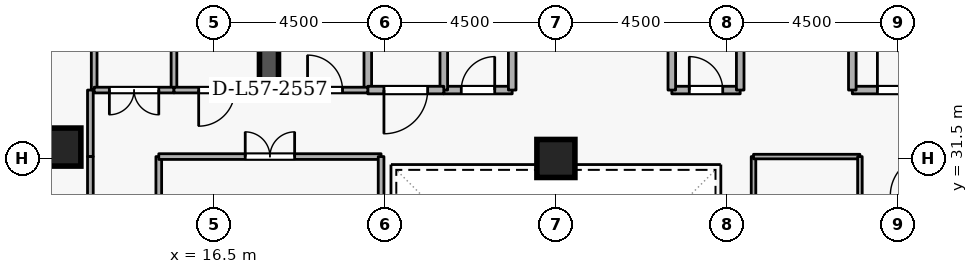
"""IFC4 building model, lengths in metres.
Left out: names, types, materials, properties, quantities, classifications, styles, units other than length and angle.
Written with IfcOpenShell. Run it as: python <this file> out.ifc"""

import sys

from ifc_helpers import new_model, si_unit, direction, frame, frame_2d, origin, origin_2d, place, context, subcontext, project, spatial, rectangle, extrude, element, fill, save


model = new_model("IFC4")
c1 = context("Model", 3, precision=1e-05, world=origin(), true_north=direction((0.0, 1.0)))
c2 = subcontext(c1, "Body", "Model", "MODEL_VIEW")
j1 = project(units=[si_unit("LENGTHUNIT", "METRE"), si_unit("PLANEANGLEUNIT", "RADIAN")], contexts=[c1])
p1 = place(None, origin())
s1 = spatial("IfcSite", under=j1, at=p1, CompositionType="ELEMENT")
p2 = place(p1, origin())
s2 = spatial("IfcBuilding", under=s1, at=p2, CompositionType="ELEMENT")
p3 = place(p2, frame((0.0, 0.0, 214.5)))
s3 = spatial("IfcBuildingStorey", under=s2, at=p3, CompositionType="ELEMENT", Elevation=214.5)
p4 = place(p3, frame((17.95, 33.1, 0.0), z_axis=(0.0, 0.0, 1.0), x_axis=(0.0, 1.0, 0.0)))
e1 = element("IfcWall", 1, at=p4, inside=s3, PredefinedType="SHEAR", context=c2, shape_type="SweptSolid", body=[
    extrude(rectangle(XDim=5.8, YDim=0.5, at=frame_2d((2.9, 0.0))), origin(), (0.0, 0.0, 1.0), 3.6),
])
for number, where, z_axis, x_axis in (
    (2, (12.5, 31.8, 0.0), (0.0, 0.0, 1.0), (1.0, 0.0, 0.0)),
    (3, (25.5, 31.5, 0.0), (0.0, 0.0, 1.0), (1.0, 0.0, 0.0)),
):
    element("IfcColumn", number, at=place(p3, frame(where, z_axis=z_axis, x_axis=x_axis)), inside=s3, PredefinedType="COLUMN", context=c2, shape_type="SweptSolid", body=[
        extrude(rectangle(XDim=1.0, YDim=1.0, at=origin_2d()), origin(), (0.0, 0.0, 1.0), 3.6),
    ])
p5 = place(p3, frame((33.3, 33.3, 0.0), z_axis=(0.0, 0.0, 1.0), x_axis=(1.0, 0.0, 0.0)))
e4 = element("IfcWall", 4, at=p5, inside=s3, PredefinedType="STANDARD", context=c2, shape_type="SweptSolid", body=[
    extrude(rectangle(XDim=2.5, YDim=0.2, at=frame_2d((1.25, 0.0))), origin(), (0.0, 0.0, 1.0), 3.34),
])
p6 = place(p5, frame((0.66, 0.0, 0.0)))
e5 = element("IfcOpeningElement", 5, at=p6, cuts=e4, PredefinedType="OPENING", context=c2, shape_type="SweptSolid", body=[
    extrude(rectangle(XDim=1.15, YDim=2.1, at=frame_2d((0.575, 1.05))), frame((0.0, 0.11, 0.0), z_axis=(0.0, -1.0, 0.0), x_axis=(1.0, 0.0, 0.0)), (0.0, 0.0, 1.0), 0.22),
])
p7 = place(p3, frame((33.3, 35.6, 0.0), z_axis=(0.0, 0.0, 1.0), x_axis=(0.0, -1.0, 0.0)))
e6 = element("IfcWall", 6, at=p7, inside=s3, PredefinedType="STANDARD", context=c2, shape_type="SweptSolid", body=[
    extrude(rectangle(XDim=2.3, YDim=0.2, at=frame_2d((1.15, 0.0))), origin(), (0.0, 0.0, 1.0), 2.545),
])
p8 = place(p3, frame((22.55, 33.3, 0.0), z_axis=(0.0, 0.0, 1.0), x_axis=(1.0, 0.0, 0.0)))
e7 = element("IfcWall", 7, at=p8, inside=s3, PredefinedType="STANDARD", context=c2, shape_type="SweptSolid", body=[
    extrude(rectangle(XDim=1.8, YDim=0.2, at=frame_2d((0.9, 0.0))), origin(), (0.0, 0.0, 1.0), 3.34),
])
p9 = place(p8, frame((0.46, 0.0, 0.0)))
e8 = element("IfcOpeningElement", 8, at=p9, cuts=e7, PredefinedType="OPENING", context=c2, shape_type="SweptSolid", body=[
    extrude(rectangle(XDim=0.88, YDim=2.04, at=frame_2d((0.44, 1.02))), frame((0.0, 0.11, 0.0), z_axis=(0.0, -1.0, 0.0), x_axis=(1.0, 0.0, 0.0)), (0.0, 0.0, 1.0), 0.22),
])
for number, where, z_axis, x_axis in (
    (9, (24.35, 33.3, 0.0), (0.0, 0.0, 1.0), (0.0, 1.0, 0.0)),
    (10, (22.55, 35.35, 0.0), (0.0, 0.0, 1.0), (0.0, -1.0, 0.0)),
):
    element("IfcWall", number, at=place(p3, frame(where, z_axis=z_axis, x_axis=x_axis)), inside=s3, PredefinedType="STANDARD", context=c2, shape_type="SweptSolid", body=[
        extrude(rectangle(XDim=2.05, YDim=0.2, at=frame_2d((1.025, 0.0))), origin(), (0.0, 0.0, 1.0), 3.34),
    ])
p10 = place(p3, frame((28.55, 33.3, 0.0), z_axis=(0.0, 0.0, 1.0), x_axis=(1.0, 0.0, 0.0)))
e11 = element("IfcWall", 11, at=p10, inside=s3, PredefinedType="STANDARD", context=c2, shape_type="SweptSolid", body=[
    extrude(rectangle(XDim=1.8, YDim=0.2, at=frame_2d((0.9, 0.0))), origin(), (0.0, 0.0, 1.0), 3.34),
])
p11 = place(p10, frame((0.46, 0.0, 0.0)))
e12 = element("IfcOpeningElement", 12, at=p11, cuts=e11, PredefinedType="OPENING", context=c2, shape_type="SweptSolid", body=[
    extrude(rectangle(XDim=0.88, YDim=2.04, at=frame_2d((0.44, 1.02))), frame((0.0, 0.11, 0.0), z_axis=(0.0, -1.0, 0.0), x_axis=(1.0, 0.0, 0.0)), (0.0, 0.0, 1.0), 0.22),
])
for number, where, z_axis, x_axis in (
    (13, (30.35, 33.3, 0.0), (0.0, 0.0, 1.0), (0.0, 1.0, 0.0)),
    (14, (28.55, 35.35, 0.0), (0.0, 0.0, 1.0), (0.0, -1.0, 0.0)),
    (15, (20.55, 33.3, 0.0), (0.0, 0.0, 1.0), (0.0, 1.0, 0.0)),
):
    element("IfcWall", number, at=place(p3, frame(where, z_axis=z_axis, x_axis=x_axis)), inside=s3, PredefinedType="STANDARD", context=c2, shape_type="SweptSolid", body=[
        extrude(rectangle(XDim=2.05, YDim=0.2, at=frame_2d((1.025, 0.0))), origin(), (0.0, 0.0, 1.0), 3.34),
    ])
p12 = place(p3, frame((22.55, 33.3, 0.0), z_axis=(0.0, 0.0, 1.0), x_axis=(-1.0, 0.0, 0.0)))
e16 = element("IfcWall", 16, at=p12, inside=s3, PredefinedType="STANDARD", context=c2, shape_type="SweptSolid", body=[
    extrude(rectangle(XDim=2.0, YDim=0.2, at=frame_2d((1.0, 0.0))), origin(), (0.0, 0.0, 1.0), 3.34),
])
p13 = place(p12, frame((0.425, 0.0, 0.0)))
e17 = element("IfcOpeningElement", 17, at=p13, cuts=e16, PredefinedType="OPENING", context=c2, shape_type="SweptSolid", body=[
    extrude(rectangle(XDim=1.15, YDim=2.1, at=frame_2d((0.575, 1.05))), frame((0.0, 0.11, 0.0), z_axis=(0.0, -1.0, 0.0), x_axis=(1.0, 0.0, 0.0)), (0.0, 0.0, 1.0), 0.22),
])
p14 = place(p3, frame((18.3, 33.3, 0.0), z_axis=(0.0, 0.0, 1.0), x_axis=(1.0, 0.0, 0.0)))
e18 = element("IfcWall", 18, at=p14, inside=s3, PredefinedType="PARTITIONING", context=c2, shape_type="SweptSolid", body=[
    extrude(rectangle(XDim=2.25, YDim=0.15, at=frame_2d((1.125, 0.0))), origin(), (0.0, 0.0, 1.0), 3.34),
])
p15 = place(p14, frame((0.665, 0.0, 0.0)))
e19 = element("IfcOpeningElement", 19, at=p15, cuts=e18, PredefinedType="OPENING", context=c2, shape_type="SweptSolid", body=[
    extrude(rectangle(XDim=0.92, YDim=2.08, at=frame_2d((0.46, 1.04))), frame((0.0, 0.085, 0.0), z_axis=(0.0, -1.0, 0.0), x_axis=(1.0, 0.0, 0.0)), (0.0, 0.0, 1.0), 0.17),
])
for number, where, z_axis, x_axis in (
    (20, (13.35, 33.3, 0.0), (0.0, 0.0, 1.0), (0.0, 1.0, 0.0)),
    (21, (15.45, 50.72, 0.0), (0.0, 0.0, 1.0), (0.0, -1.0, 0.0)),
):
    element("IfcWall", number, at=place(p3, frame(where, z_axis=z_axis, x_axis=x_axis)), inside=s3, PredefinedType="PARTITIONING", context=c2, shape_type="SweptSolid", body=[
        extrude(rectangle(XDim=17.42, YDim=0.15, at=frame_2d((8.71, 0.0))), origin(), (0.0, 0.0, 1.0), 3.34),
    ])
p16 = place(p3, frame((15.45, 33.3, 0.0), z_axis=(0.0, 0.0, 1.0), x_axis=(-1.0, 0.0, 0.0)))
e22 = element("IfcWall", 22, at=p16, inside=s3, PredefinedType="PARTITIONING", context=c2, shape_type="SweptSolid", body=[
    extrude(rectangle(XDim=2.1, YDim=0.15, at=frame_2d((1.05, 0.0))), origin(), (0.0, 0.0, 1.0), 3.34),
])
p17 = place(p16, frame((0.4, 0.0, 0.0)))
e23 = element("IfcOpeningElement", 23, at=p17, cuts=e22, PredefinedType="OPENING", context=c2, shape_type="SweptSolid", body=[
    extrude(rectangle(XDim=1.3, YDim=2.12, at=frame_2d((0.65, 1.06))), frame((0.0, 0.085, 0.0), z_axis=(0.0, -1.0, 0.0), x_axis=(1.0, 0.0, 0.0)), (0.0, 0.0, 1.0), 0.17),
])
p18 = place(p3, frame((17.7, 33.3, 0.0), z_axis=(0.0, 0.0, 1.0), x_axis=(-1.0, 0.0, 0.0)))
e24 = element("IfcWall", 24, at=p18, inside=s3, PredefinedType="PARTITIONING", context=c2, shape_type="SweptSolid", body=[
    extrude(rectangle(XDim=2.25, YDim=0.15, at=frame_2d((1.125, 0.0))), origin(), (0.0, 0.0, 1.0), 3.34),
])
p19 = place(p18, frame((0.65, 0.0, 0.0)))
e25 = element("IfcOpeningElement", 25, at=p19, cuts=e24, PredefinedType="OPENING", context=c2, shape_type="SweptSolid", body=[
    extrude(rectangle(XDim=0.95, YDim=2.1, at=frame_2d((0.475, 1.05))), frame((0.0, 0.085, 0.0), z_axis=(0.0, -1.0, 0.0), x_axis=(1.0, 0.0, 0.0)), (0.0, 0.0, 1.0), 0.17),
])
p20 = place(p3, frame((13.25, 33.3, 0.0), z_axis=(0.0, 0.0, 1.0), x_axis=(0.0, -1.0, 0.0)))
e26 = element("IfcWall", 26, at=p20, inside=s3, PredefinedType="PARTITIONING", context=c2, shape_type="SweptSolid", body=[
    extrude(rectangle(XDim=1.75, YDim=0.15, at=frame_2d((0.875, 0.0))), origin(), (0.0, 0.0, 1.0), 3.34),
])
p21 = place(p3, frame((13.25, 31.55, 0.0), z_axis=(0.0, 0.0, 1.0), x_axis=(0.0, -1.0, 0.0)))
e27 = element("IfcWall", 27, at=p21, inside=s3, PredefinedType="PARTITIONING", context=c2, shape_type="SweptSolid", body=[
    extrude(rectangle(XDim=3.35, YDim=0.15, at=frame_2d((1.675, 0.0))), origin(), (0.0, 0.0, 1.0), 3.34),
])
p22 = place(p21, frame((1.025, 0.0, 0.0)))
e28 = element("IfcOpeningElement", 28, at=p22, cuts=e27, PredefinedType="OPENING", context=c2, shape_type="SweptSolid", body=[
    extrude(rectangle(XDim=1.3, YDim=2.12, at=frame_2d((0.65, 1.06))), frame((0.0, 0.085, 0.0), z_axis=(0.0, -1.0, 0.0), x_axis=(1.0, 0.0, 0.0)), (0.0, 0.0, 1.0), 0.17),
])
p23 = place(p3, frame((15.05, 28.2, 0.0), z_axis=(0.0, 0.0, 1.0), x_axis=(0.0, 1.0, 0.0)))
e29 = element("IfcWall", 29, at=p23, inside=s3, PredefinedType="PARTITIONING", context=c2, shape_type="SweptSolid", body=[
    extrude(rectangle(XDim=3.35, YDim=0.15, at=frame_2d((1.675, 0.0))), origin(), (0.0, 0.0, 1.0), 3.34),
])
p24 = place(p3, frame((15.05, 31.55, 0.0), z_axis=(0.0, 0.0, 1.0), x_axis=(1.0, 0.0, 0.0)))
e30 = element("IfcWall", 30, at=p24, inside=s3, PredefinedType="PARTITIONING", context=c2, shape_type="SweptSolid", body=[
    extrude(rectangle(XDim=5.85, YDim=0.15, at=frame_2d((2.925, 0.0))), origin(), (0.0, 0.0, 1.0), 3.34),
])
p25 = place(p24, frame((2.275, 0.0, 0.0)))
e31 = element("IfcOpeningElement", 31, at=p25, cuts=e30, PredefinedType="OPENING", context=c2, shape_type="SweptSolid", body=[
    extrude(rectangle(XDim=1.3, YDim=2.12, at=frame_2d((0.65, 1.06))), frame((0.0, 0.085, 0.0), z_axis=(0.0, -1.0, 0.0), x_axis=(1.0, 0.0, 0.0)), (0.0, 0.0, 1.0), 0.17),
])
p26 = place(p3, frame((20.9, 31.55, 0.0), z_axis=(0.0, 0.0, 1.0), x_axis=(0.0, -1.0, 0.0)))
e32 = element("IfcWall", 32, at=p26, inside=s3, PredefinedType="PARTITIONING", context=c2, shape_type="SweptSolid", body=[
    extrude(rectangle(XDim=3.35, YDim=0.15, at=frame_2d((1.675, 0.0))), origin(), (0.0, 0.0, 1.0), 3.34),
])
p27 = place(p3, frame((30.7, 27.0, 0.0), z_axis=(0.0, 0.0, 1.0), x_axis=(0.0, 1.0, 0.0)))
e33 = element("IfcWall", 33, at=p27, inside=s3, PredefinedType="PARTITIONING", context=c2, shape_type="SweptSolid", body=[
    extrude(rectangle(XDim=4.55, YDim=0.12, at=frame_2d((2.275, 0.0))), origin(), (0.0, 0.0, 1.0), 3.34),
])
p28 = place(p3, frame((30.7, 31.55, 0.0), z_axis=(0.0, 0.0, 1.0), x_axis=(1.0, 0.0, 0.0)))
e34 = element("IfcWall", 34, at=p28, inside=s3, PredefinedType="PARTITIONING", context=c2, shape_type="SweptSolid", body=[
    extrude(rectangle(XDim=2.8, YDim=0.12, at=frame_2d((1.4, 0.0))), origin(), (0.0, 0.0, 1.0), 3.34),
])
p29 = place(p3, frame((33.5, 31.55, 0.0), z_axis=(0.0, 0.0, 1.0), x_axis=(0.0, -1.0, 0.0)))
e35 = element("IfcWall", 35, at=p29, inside=s3, PredefinedType="PARTITIONING", context=c2, shape_type="SweptSolid", body=[
    extrude(rectangle(XDim=4.55, YDim=0.12, at=frame_2d((2.275, 0.0))), origin(), (0.0, 0.0, 1.0), 3.34),
])
p30 = place(p29, frame((1.8, 0.0, 0.0)))
e36 = element("IfcOpeningElement", 36, at=p30, cuts=e35, PredefinedType="OPENING", context=c2, shape_type="SweptSolid", body=[
    extrude(rectangle(XDim=0.95, YDim=2.1, at=frame_2d((0.475, 1.05))), frame((0.0, 0.07, 0.0), z_axis=(0.0, -1.0, 0.0), x_axis=(1.0, 0.0, 0.0)), (0.0, 0.0, 1.0), 0.14),
])
p31 = place(p6, origin())
e37 = element("IfcDoor", 37, at=p31, inside=s3, OperationType="SINGLE_SWING_LEFT", PredefinedType="DOOR", context=c2, shape_type="SweptSolid", body=[
    extrude(rectangle(XDim=1.15, YDim=2.1, at=frame_2d((0.575, 1.05))), frame((0.0, 0.025, 0.0), z_axis=(0.0, -1.0, 0.0), x_axis=(1.0, 0.0, 0.0)), (0.0, 0.0, 1.0), 0.05),
])
fill(e5, e37)
p32 = place(p9, origin())
e38 = element("IfcDoor", 38, at=p32, inside=s3, OperationType="SINGLE_SWING_RIGHT", PredefinedType="DOOR", context=c2, shape_type="SweptSolid", body=[
    extrude(rectangle(XDim=0.88, YDim=2.04, at=frame_2d((0.44, 1.02))), frame((0.0, 0.025, 0.0), z_axis=(0.0, -1.0, 0.0), x_axis=(1.0, 0.0, 0.0)), (0.0, 0.0, 1.0), 0.05),
])
fill(e8, e38)
p33 = place(p11, origin())
e39 = element("IfcDoor", 39, at=p33, inside=s3, OperationType="SINGLE_SWING_LEFT", PredefinedType="DOOR", context=c2, shape_type="SweptSolid", body=[
    extrude(rectangle(XDim=0.88, YDim=2.04, at=frame_2d((0.44, 1.02))), frame((0.0, 0.025, 0.0), z_axis=(0.0, -1.0, 0.0), x_axis=(1.0, 0.0, 0.0)), (0.0, 0.0, 1.0), 0.05),
])
fill(e12, e39)
p34 = place(p15, origin())
e40 = element("IfcDoor", 40, at=p34, inside=s3, OperationType="SINGLE_SWING_LEFT", PredefinedType="DOOR", context=c2, shape_type="SweptSolid", body=[
    extrude(rectangle(XDim=0.92, YDim=2.08, at=frame_2d((0.46, 1.04))), frame((0.0, 0.025, 0.0), z_axis=(0.0, -1.0, 0.0), x_axis=(1.0, 0.0, 0.0)), (0.0, 0.0, 1.0), 0.05),
])
fill(e19, e40)
p35 = place(p13, origin())
e41 = element("IfcDoor", 41, at=p35, inside=s3, OperationType="SINGLE_SWING_RIGHT", PredefinedType="DOOR", context=c2, shape_type="SweptSolid", body=[
    extrude(rectangle(XDim=1.15, YDim=2.1, at=frame_2d((0.575, 1.05))), frame((0.0, 0.025, 0.0), z_axis=(0.0, -1.0, 0.0), x_axis=(1.0, 0.0, 0.0)), (0.0, 0.0, 1.0), 0.05),
])
fill(e17, e41)
p36 = place(p17, origin())
e42 = element("IfcDoor", 42, at=p36, inside=s3, OperationType="DOUBLE_DOOR_SINGLE_SWING", PredefinedType="DOOR", context=c2, shape_type="SweptSolid", body=[
    extrude(rectangle(XDim=1.3, YDim=2.12, at=frame_2d((0.65, 1.06))), frame((0.0, 0.025, 0.0), z_axis=(0.0, -1.0, 0.0), x_axis=(1.0, 0.0, 0.0)), (0.0, 0.0, 1.0), 0.05),
])
fill(e23, e42)
p37 = place(p19, origin())
e43 = element("IfcDoor", 43, at=p37, inside=s3, OperationType="SINGLE_SWING_RIGHT", PredefinedType="DOOR", context=c2, shape_type="SweptSolid", body=[
    extrude(rectangle(XDim=0.95, YDim=2.1, at=frame_2d((0.475, 1.05))), frame((0.0, 0.025, 0.0), z_axis=(0.0, -1.0, 0.0), x_axis=(1.0, 0.0, 0.0)), (0.0, 0.0, 1.0), 0.05),
])
fill(e25, e43)
p38 = place(p25, origin())
e44 = element("IfcDoor", 44, at=p38, inside=s3, OperationType="DOUBLE_DOOR_SINGLE_SWING", PredefinedType="DOOR", context=c2, shape_type="SweptSolid", body=[
    extrude(rectangle(XDim=1.3, YDim=2.12, at=frame_2d((0.65, 1.06))), frame((0.0, 0.025, 0.0), z_axis=(0.0, -1.0, 0.0), x_axis=(1.0, 0.0, 0.0)), (0.0, 0.0, 1.0), 0.05),
])
fill(e31, e44)
save(model, sys.argv[1])
